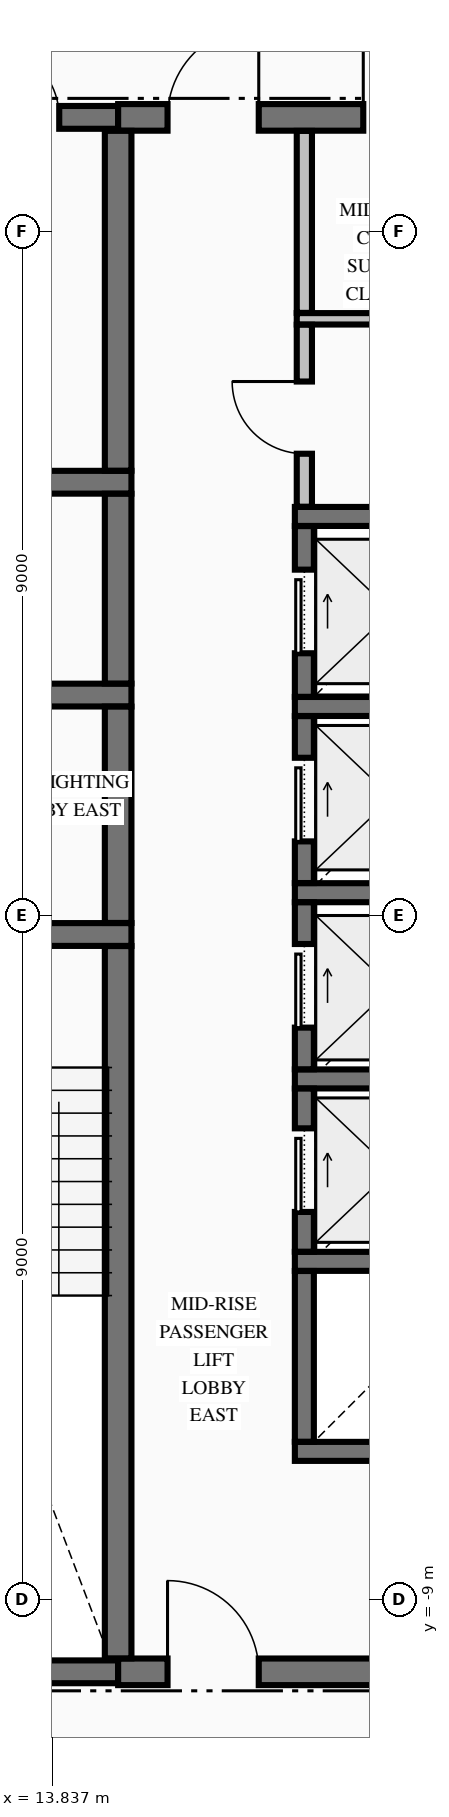
"""IFC4 building model, lengths in metres.
Left out: names, types, materials, properties, quantities, classifications, styles, units other than length and angle.
Written with IfcOpenShell. Run it as: python <this file> out.ifc"""

import sys

from ifc_helpers import new_model, si_unit, direction, frame, frame_2d, origin, place, context, subcontext, project, spatial, rectangle, extrude, element, fill, save


model = new_model("IFC4")
c1 = context("Model", 3, precision=1e-05, world=origin(), true_north=direction((0.0, 1.0)))
c2 = subcontext(c1, "Body", "Model", "MODEL_VIEW")
j1 = project(units=[si_unit("LENGTHUNIT", "METRE"), si_unit("PLANEANGLEUNIT", "RADIAN")], contexts=[c1])
p1 = place(None, origin())
s1 = spatial("IfcSite", under=j1, at=p1, CompositionType="ELEMENT")
p2 = place(p1, origin())
s2 = spatial("IfcBuilding", under=s1, at=p2, CompositionType="ELEMENT")
p3 = place(p2, frame((0.0, 0.0, 139.2)))
s3 = spatial("IfcBuildingStorey", under=s2, at=p3, CompositionType="ELEMENT", Elevation=139.2)
p4 = place(p3, frame((11.504, -9.95, 0.0), z_axis=(0.0, 0.0, 1.0), x_axis=(1.0, 0.0, 0.0)))
e1 = element("IfcWall", 1, at=p4, inside=s3, PredefinedType="SHEAR", context=c2, shape_type="SweptSolid", body=[
    extrude(rectangle(XDim=3.196, YDim=0.3, at=frame_2d((1.598, 0.0))), origin(), (0.0, 0.0, 1.0), 3.245),
])
p5 = place(p3, frame((14.7, -9.95, 0.0), z_axis=(0.0, 0.0, 1.0), x_axis=(1.0, 0.0, 0.0)))
e2 = element("IfcWall", 2, at=p5, inside=s3, PredefinedType="SHEAR", context=c2, shape_type="SweptSolid", body=[
    extrude(rectangle(XDim=4.796, YDim=0.35, at=frame_2d((2.398, 0.0))), origin(), (0.0, 0.0, 1.0), 3.245),
])
p6 = place(p5, frame((0.65, 0.0, 0.0)))
e3 = element("IfcOpeningElement", 3, at=p6, cuts=e2, PredefinedType="OPENING", context=c2, shape_type="SweptSolid", body=[
    extrude(rectangle(XDim=1.2, YDim=2.15, at=frame_2d((0.6, 1.075))), frame((0.0, 0.185, 0.0), z_axis=(0.0, -1.0, 0.0), x_axis=(1.0, 0.0, 0.0)), (0.0, 0.0, 1.0), 0.37),
])
for number, where, z_axis, x_axis in (
    (4, (17.025, -7.05, 0.0), (0.0, 0.0, 1.0), (1.0, 0.0, 0.0)),
    (5, (17.025, -4.55, 0.0), (0.0, 0.0, 1.0), (1.0, 0.0, 0.0)),
    (6, (17.025, -2.15, 0.0), (0.0, 0.0, 1.0), (1.0, 0.0, 0.0)),
):
    element("IfcWall", number, at=place(p3, frame(where, z_axis=z_axis, x_axis=x_axis)), inside=s3, PredefinedType="SOLIDWALL", context=c2, shape_type="SweptSolid", body=[
        extrude(rectangle(XDim=3.15, YDim=0.25, at=frame_2d((1.575, 0.0))), origin(), (0.0, 0.0, 1.0), 3.245),
    ])
p7 = place(p3, frame((11.504, -0.25, 0.0), z_axis=(0.0, 0.0, 1.0), x_axis=(1.0, 0.0, 0.0)))
e7 = element("IfcWall", 7, at=p7, inside=s3, PredefinedType="SHEAR", context=c2, shape_type="SweptSolid", body=[
    extrude(rectangle(XDim=3.371, YDim=0.3, at=frame_2d((1.686, 0.0))), origin(), (0.0, 0.0, 1.0), 3.245),
])
p8 = place(p7, frame((1.096, 0.0, 0.0)))
e8 = element("IfcOpeningElement", 8, at=p8, cuts=e7, PredefinedType="OPENING", context=c2, shape_type="SweptSolid", body=[
    extrude(rectangle(XDim=1.1, YDim=2.15, at=frame_2d((0.55, 1.075))), frame((0.0, 0.16, 0.0), z_axis=(0.0, -1.0, 0.0), x_axis=(1.0, 0.0, 0.0)), (0.0, 0.0, 1.0), 0.32),
])
p9 = place(p3, frame((17.025, 0.3, 0.0), z_axis=(0.0, 0.0, 1.0), x_axis=(1.0, 0.0, 0.0)))
e9 = element("IfcWall", 9, at=p9, inside=s3, PredefinedType="SOLIDWALL", context=c2, shape_type="SweptSolid", body=[
    extrude(rectangle(XDim=2.471, YDim=0.25, at=frame_2d((1.236, 0.0))), origin(), (0.0, 0.0, 1.0), 3.245),
])
p10 = place(p3, frame((17.025, 2.75, 0.0), z_axis=(0.0, 0.0, 1.0), x_axis=(1.0, 0.0, 0.0)))
e10 = element("IfcWall", 10, at=p10, inside=s3, PredefinedType="SOLIDWALL", context=c2, shape_type="SweptSolid", body=[
    extrude(rectangle(XDim=3.15, YDim=0.25, at=frame_2d((1.575, 0.0))), origin(), (0.0, 0.0, 1.0), 3.245),
])
p11 = place(p3, frame((10.85, 2.9, 0.0), z_axis=(0.0, 0.0, 1.0), x_axis=(1.0, 0.0, 0.0)))
e11 = element("IfcWall", 11, at=p11, inside=s3, PredefinedType="SHEAR", context=c2, shape_type="SweptSolid", body=[
    extrude(rectangle(XDim=4.025, YDim=0.3, at=frame_2d((2.012, 0.0))), origin(), (0.0, 0.0, 1.0), 3.245),
])
p12 = place(p11, frame((0.85, 0.0, 0.0)))
e12 = element("IfcOpeningElement", 12, at=p12, cuts=e11, PredefinedType="OPENING", context=c2, shape_type="SweptSolid", body=[
    extrude(rectangle(XDim=1.1, YDim=2.2, at=frame_2d((0.55, 1.1))), frame((0.0, 0.16, 0.0), z_axis=(0.0, -1.0, 0.0), x_axis=(1.0, 0.0, 0.0)), (0.0, 0.0, 1.0), 0.32),
])
p13 = place(p3, frame((17.025, 5.25, 0.0), z_axis=(0.0, 0.0, 1.0), x_axis=(1.0, 0.0, 0.0)))
e13 = element("IfcWall", 13, at=p13, inside=s3, PredefinedType="SOLIDWALL", context=c2, shape_type="SweptSolid", body=[
    extrude(rectangle(XDim=3.15, YDim=0.25, at=frame_2d((1.575, 0.0))), origin(), (0.0, 0.0, 1.0), 3.245),
])
p14 = place(p3, frame((10.85, 5.7, 0.0), z_axis=(0.0, 0.0, 1.0), x_axis=(1.0, 0.0, 0.0)))
e14 = element("IfcWall", 14, at=p14, inside=s3, PredefinedType="SHEAR", context=c2, shape_type="SweptSolid", body=[
    extrude(rectangle(XDim=4.025, YDim=0.3, at=frame_2d((2.012, 0.0))), origin(), (0.0, 0.0, 1.0), 3.245),
])
p15 = place(p3, frame((11.504, 10.5, 0.0), z_axis=(0.0, 0.0, 1.0), x_axis=(1.0, 0.0, 0.0)))
e15 = element("IfcWall", 15, at=p15, inside=s3, PredefinedType="SHEAR", context=c2, shape_type="SweptSolid", body=[
    extrude(rectangle(XDim=3.196, YDim=0.3, at=frame_2d((1.598, 0.0))), origin(), (0.0, 0.0, 1.0), 3.245),
])
p16 = place(p15, frame((1.471, 0.0, 0.0)))
e16 = element("IfcOpeningElement", 16, at=p16, cuts=e15, PredefinedType="OPENING", context=c2, shape_type="SweptSolid", body=[
    extrude(rectangle(XDim=0.95, YDim=2.15, at=frame_2d((0.475, 1.075))), frame((0.0, 0.16, 0.0), z_axis=(0.0, -1.0, 0.0), x_axis=(1.0, 0.0, 0.0)), (0.0, 0.0, 1.0), 0.32),
])
p17 = place(p3, frame((14.7, 10.5, 0.0), z_axis=(0.0, 0.0, 1.0), x_axis=(1.0, 0.0, 0.0)))
e17 = element("IfcWall", 17, at=p17, inside=s3, PredefinedType="SHEAR", context=c2, shape_type="SweptSolid", body=[
    extrude(rectangle(XDim=4.796, YDim=0.35, at=frame_2d((2.398, 0.0))), origin(), (0.0, 0.0, 1.0), 3.245),
])
p18 = place(p17, frame((0.65, 0.0, 0.0)))
e18 = element("IfcOpeningElement", 18, at=p18, cuts=e17, PredefinedType="OPENING", context=c2, shape_type="SweptSolid", body=[
    extrude(rectangle(XDim=1.2, YDim=2.15, at=frame_2d((0.6, 1.075))), frame((0.0, 0.185, 0.0), z_axis=(0.0, -1.0, 0.0), x_axis=(1.0, 0.0, 0.0)), (0.0, 0.0, 1.0), 0.37),
])
p19 = place(p17, frame((3.225, 0.0, 0.0)))
e19 = element("IfcOpeningElement", 19, at=p19, cuts=e17, PredefinedType="OPENING", context=c2, shape_type="SweptSolid", body=[
    extrude(rectangle(XDim=0.95, YDim=2.15, at=frame_2d((0.475, 1.075))), frame((0.0, 0.185, 0.0), z_axis=(0.0, -1.0, 0.0), x_axis=(1.0, 0.0, 0.0)), (0.0, 0.0, 1.0), 0.37),
])
p20 = place(p3, frame((17.05, 7.85, 0.0), z_axis=(0.0, 0.0, 1.0), x_axis=(1.0, 0.0, 0.0)))
e20 = element("IfcWall", 20, at=p20, inside=s3, PredefinedType="PARTITIONING", context=c2, shape_type="SweptSolid", body=[
    extrude(rectangle(XDim=2.772, YDim=0.15, at=frame_2d((1.386, 0.0))), origin(), (0.0, 0.0, 1.0), 3.245),
])
p21 = place(p3, frame((14.7, -9.773, 0.0), z_axis=(0.0, 0.0, 1.0), x_axis=(0.0, 1.0, 0.0)))
e21 = element("IfcWall", 21, at=p21, inside=s3, PredefinedType="SHEAR", context=c2, shape_type="SweptSolid", body=[
    extrude(rectangle(XDim=9.371, YDim=0.35, at=frame_2d((4.686, 0.0))), origin(), (0.0, 0.0, 1.0), 3.245),
])
p22 = place(p3, frame((14.7, -0.098, 0.0), z_axis=(0.0, 0.0, 1.0), x_axis=(0.0, 1.0, 0.0)))
e22 = element("IfcWall", 22, at=p22, inside=s3, PredefinedType="SHEAR", context=c2, shape_type="SweptSolid", body=[
    extrude(rectangle(XDim=2.846, YDim=0.35, at=frame_2d((1.423, 0.0))), origin(), (0.0, 0.0, 1.0), 3.245),
])
p23 = place(p3, frame((14.7, 3.052, 0.0), z_axis=(0.0, 0.0, 1.0), x_axis=(0.0, 1.0, 0.0)))
e23 = element("IfcWall", 23, at=p23, inside=s3, PredefinedType="SHEAR", context=c2, shape_type="SweptSolid", body=[
    extrude(rectangle(XDim=2.496, YDim=0.35, at=frame_2d((1.248, 0.0))), origin(), (0.0, 0.0, 1.0), 3.245),
])
p24 = place(p3, frame((14.7, 5.852, 0.0), z_axis=(0.0, 0.0, 1.0), x_axis=(0.0, 1.0, 0.0)))
e24 = element("IfcWall", 24, at=p24, inside=s3, PredefinedType="SHEAR", context=c2, shape_type="SweptSolid", body=[
    extrude(rectangle(XDim=4.471, YDim=0.35, at=frame_2d((2.235, 0.0))), origin(), (0.0, 0.0, 1.0), 3.245),
])
p25 = place(p3, frame((17.15, -6.923, 0.0), z_axis=(0.0, 0.0, 1.0), x_axis=(0.0, 1.0, 0.0)))
e25 = element("IfcWall", 25, at=p25, inside=s3, PredefinedType="SOLIDWALL", context=c2, shape_type="SweptSolid", body=[
    extrude(rectangle(XDim=2.246, YDim=0.25, at=frame_2d((1.123, 0.0))), origin(), (0.0, 0.0, 1.0), 3.245),
])
p26 = place(p3, frame((17.15, -4.423, 0.0), z_axis=(0.0, 0.0, 1.0), x_axis=(0.0, 1.0, 0.0)))
e26 = element("IfcWall", 26, at=p26, inside=s3, PredefinedType="SOLIDWALL", context=c2, shape_type="SweptSolid", body=[
    extrude(rectangle(XDim=2.146, YDim=0.25, at=frame_2d((1.073, 0.0))), origin(), (0.0, 0.0, 1.0), 3.245),
])
p27 = place(p26, frame((0.523, 0.0, 0.0)))
e27 = element("IfcOpeningElement", 27, at=p27, cuts=e26, PredefinedType="OPENING", context=c2, shape_type="SweptSolid", body=[
    extrude(rectangle(XDim=1.1, YDim=2.2, at=frame_2d((0.55, 1.1))), frame((0.0, 0.135, 0.0), z_axis=(0.0, -1.0, 0.0), x_axis=(1.0, 0.0, 0.0)), (0.0, 0.0, 1.0), 0.27),
])
p28 = place(p3, frame((17.15, -2.023, 0.0), z_axis=(0.0, 0.0, 1.0), x_axis=(0.0, 1.0, 0.0)))
e28 = element("IfcWall", 28, at=p28, inside=s3, PredefinedType="SOLIDWALL", context=c2, shape_type="SweptSolid", body=[
    extrude(rectangle(XDim=2.196, YDim=0.25, at=frame_2d((1.098, 0.0))), origin(), (0.0, 0.0, 1.0), 3.245),
])
p29 = place(p28, frame((0.548, 0.0, 0.0)))
e29 = element("IfcOpeningElement", 29, at=p29, cuts=e28, PredefinedType="OPENING", context=c2, shape_type="SweptSolid", body=[
    extrude(rectangle(XDim=1.1, YDim=2.2, at=frame_2d((0.55, 1.1))), frame((0.0, 0.135, 0.0), z_axis=(0.0, -1.0, 0.0), x_axis=(1.0, 0.0, 0.0)), (0.0, 0.0, 1.0), 0.27),
])
p30 = place(p3, frame((17.15, 0.427, 0.0), z_axis=(0.0, 0.0, 1.0), x_axis=(0.0, 1.0, 0.0)))
e30 = element("IfcWall", 30, at=p30, inside=s3, PredefinedType="SOLIDWALL", context=c2, shape_type="SweptSolid", body=[
    extrude(rectangle(XDim=2.196, YDim=0.25, at=frame_2d((1.098, 0.0))), origin(), (0.0, 0.0, 1.0), 3.245),
])
p31 = place(p30, frame((0.548, 0.0, 0.0)))
e31 = element("IfcOpeningElement", 31, at=p31, cuts=e30, PredefinedType="OPENING", context=c2, shape_type="SweptSolid", body=[
    extrude(rectangle(XDim=1.1, YDim=2.2, at=frame_2d((0.55, 1.1))), frame((0.0, 0.135, 0.0), z_axis=(0.0, -1.0, 0.0), x_axis=(1.0, 0.0, 0.0)), (0.0, 0.0, 1.0), 0.27),
])
p32 = place(p3, frame((17.15, 2.877, 0.0), z_axis=(0.0, 0.0, 1.0), x_axis=(0.0, 1.0, 0.0)))
e32 = element("IfcWall", 32, at=p32, inside=s3, PredefinedType="SOLIDWALL", context=c2, shape_type="SweptSolid", body=[
    extrude(rectangle(XDim=2.246, YDim=0.25, at=frame_2d((1.123, 0.0))), origin(), (0.0, 0.0, 1.0), 3.245),
])
p33 = place(p32, frame((0.573, 0.0, 0.0)))
e33 = element("IfcOpeningElement", 33, at=p33, cuts=e32, PredefinedType="OPENING", context=c2, shape_type="SweptSolid", body=[
    extrude(rectangle(XDim=1.1, YDim=2.2, at=frame_2d((0.55, 1.1))), frame((0.0, 0.135, 0.0), z_axis=(0.0, -1.0, 0.0), x_axis=(1.0, 0.0, 0.0)), (0.0, 0.0, 1.0), 0.27),
])
p34 = place(p3, frame((17.15, 5.378, 0.0), z_axis=(0.0, 0.0, 1.0), x_axis=(0.0, 1.0, 0.0)))
e34 = element("IfcWall", 34, at=p34, inside=s3, PredefinedType="PARTITIONING", context=c2, shape_type="SweptSolid", body=[
    extrude(rectangle(XDim=2.394, YDim=0.2, at=frame_2d((1.197, 0.0))), origin(), (0.0, 0.0, 1.0), 3.245),
])
p35 = place(p34, frame((0.697, 0.0, 0.0)))
e35 = element("IfcOpeningElement", 35, at=p35, cuts=e34, PredefinedType="OPENING", context=c2, shape_type="SweptSolid", body=[
    extrude(rectangle(XDim=0.95, YDim=2.15, at=frame_2d((0.475, 1.075))), frame((0.0, 0.11, 0.0), z_axis=(0.0, -1.0, 0.0), x_axis=(1.0, 0.0, 0.0)), (0.0, 0.0, 1.0), 0.22),
])
p36 = place(p3, frame((17.15, 7.928, 0.0), z_axis=(0.0, 0.0, 1.0), x_axis=(0.0, 1.0, 0.0)))
e36 = element("IfcWall", 36, at=p36, inside=s3, PredefinedType="PARTITIONING", context=c2, shape_type="SweptSolid", body=[
    extrude(rectangle(XDim=2.394, YDim=0.2, at=frame_2d((1.197, 0.0))), origin(), (0.0, 0.0, 1.0), 3.245),
])
p37 = place(p16, origin())
e37 = element("IfcDoor", 37, at=p37, inside=s3, OperationType="SINGLE_SWING_LEFT", PredefinedType="DOOR", context=c2, shape_type="SweptSolid", body=[
    extrude(rectangle(XDim=0.95, YDim=2.15, at=frame_2d((0.475, 1.075))), frame((0.0, 0.025, 0.0), z_axis=(0.0, -1.0, 0.0), x_axis=(1.0, 0.0, 0.0)), (0.0, 0.0, 1.0), 0.05),
])
fill(e16, e37)
p38 = place(p27, origin())
e38 = element("IfcDoor", 38, at=p38, inside=s3, OperationType="SLIDING_TO_RIGHT", PredefinedType="DOOR", context=c2, shape_type="SweptSolid", body=[
    extrude(rectangle(XDim=1.1, YDim=2.2, at=frame_2d((0.55, 1.1))), frame((0.0, 0.025, 0.0), z_axis=(0.0, -1.0, 0.0), x_axis=(1.0, 0.0, 0.0)), (0.0, 0.0, 1.0), 0.05),
])
fill(e27, e38)
p39 = place(p29, origin())
e39 = element("IfcDoor", 39, at=p39, inside=s3, OperationType="SLIDING_TO_RIGHT", PredefinedType="DOOR", context=c2, shape_type="SweptSolid", body=[
    extrude(rectangle(XDim=1.1, YDim=2.2, at=frame_2d((0.55, 1.1))), frame((0.0, 0.025, 0.0), z_axis=(0.0, -1.0, 0.0), x_axis=(1.0, 0.0, 0.0)), (0.0, 0.0, 1.0), 0.05),
])
fill(e29, e39)
p40 = place(p31, origin())
e40 = element("IfcDoor", 40, at=p40, inside=s3, OperationType="SLIDING_TO_RIGHT", PredefinedType="DOOR", context=c2, shape_type="SweptSolid", body=[
    extrude(rectangle(XDim=1.1, YDim=2.2, at=frame_2d((0.55, 1.1))), frame((0.0, 0.025, 0.0), z_axis=(0.0, -1.0, 0.0), x_axis=(1.0, 0.0, 0.0)), (0.0, 0.0, 1.0), 0.05),
])
fill(e31, e40)
p41 = place(p33, origin())
e41 = element("IfcDoor", 41, at=p41, inside=s3, OperationType="SLIDING_TO_RIGHT", PredefinedType="DOOR", context=c2, shape_type="SweptSolid", body=[
    extrude(rectangle(XDim=1.1, YDim=2.2, at=frame_2d((0.55, 1.1))), frame((0.0, 0.025, 0.0), z_axis=(0.0, -1.0, 0.0), x_axis=(1.0, 0.0, 0.0)), (0.0, 0.0, 1.0), 0.05),
])
fill(e33, e41)
p42 = place(p6, origin())
e42 = element("IfcDoor", 42, at=p42, inside=s3, OperationType="SINGLE_SWING_LEFT", PredefinedType="DOOR", context=c2, shape_type="SweptSolid", body=[
    extrude(rectangle(XDim=1.2, YDim=2.15, at=frame_2d((0.6, 1.075))), frame((0.0, 0.025, 0.0), z_axis=(0.0, -1.0, 0.0), x_axis=(1.0, 0.0, 0.0)), (0.0, 0.0, 1.0), 0.05),
])
fill(e3, e42)
p43 = place(p18, origin())
e43 = element("IfcDoor", 43, at=p43, inside=s3, OperationType="SINGLE_SWING_RIGHT", PredefinedType="DOOR", context=c2, shape_type="SweptSolid", body=[
    extrude(rectangle(XDim=1.2, YDim=2.15, at=frame_2d((0.6, 1.075))), frame((0.0, 0.025, 0.0), z_axis=(0.0, -1.0, 0.0), x_axis=(1.0, 0.0, 0.0)), (0.0, 0.0, 1.0), 0.05),
])
fill(e18, e43)
p44 = place(p19, origin())
e44 = element("IfcDoor", 44, at=p44, inside=s3, OperationType="SINGLE_SWING_LEFT", PredefinedType="DOOR", context=c2, shape_type="SweptSolid", body=[
    extrude(rectangle(XDim=0.95, YDim=2.15, at=frame_2d((0.475, 1.075))), frame((0.0, 0.025, 0.0), z_axis=(0.0, -1.0, 0.0), x_axis=(1.0, 0.0, 0.0)), (0.0, 0.0, 1.0), 0.05),
])
fill(e19, e44)
p45 = place(p35, origin())
e45 = element("IfcDoor", 45, at=p45, inside=s3, OperationType="SINGLE_SWING_RIGHT", PredefinedType="DOOR", context=c2, shape_type="SweptSolid", body=[
    extrude(rectangle(XDim=0.95, YDim=2.15, at=frame_2d((0.475, 1.075))), frame((0.0, 0.025, 0.0), z_axis=(0.0, -1.0, 0.0), x_axis=(1.0, 0.0, 0.0)), (0.0, 0.0, 1.0), 0.05),
])
fill(e35, e45)
save(model, sys.argv[1])
